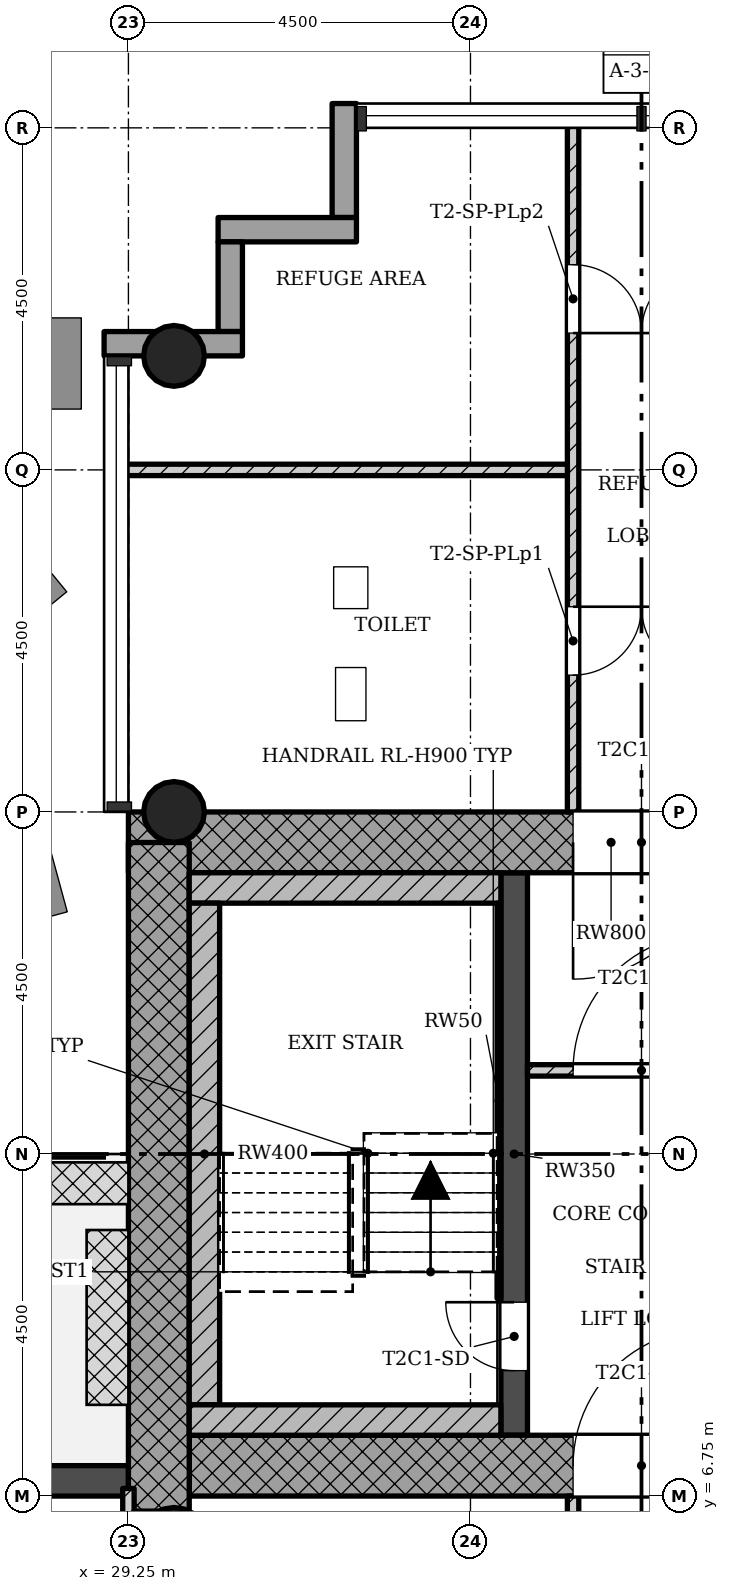
"""IFC4 building model, lengths in metres.
Left out: names, types, materials, properties, quantities, classifications, styles, units other than length and angle.
Written with IfcOpenShell. Run it as: python <this file> out.ifc"""

import sys

from ifc_helpers import new_model, si_unit, direction, frame, frame_2d, origin, origin_2d, place, context, subcontext, project, spatial, rectangle, hollow_circle, extrude, element, fill, save


model = new_model("IFC4")
c1 = context("Model", 3, precision=1e-05, world=origin(), true_north=direction((0.0, 1.0)))
c2 = subcontext(c1, "Body", "Model", "MODEL_VIEW")
j1 = project(units=[si_unit("LENGTHUNIT", "METRE"), si_unit("PLANEANGLEUNIT", "RADIAN")], contexts=[c1])
p1 = place(None, origin())
s1 = spatial("IfcSite", under=j1, at=p1, CompositionType="ELEMENT")
p2 = place(p1, origin())
s2 = spatial("IfcBuilding", under=s1, at=p2, CompositionType="ELEMENT")
p3 = place(p2, frame((0.0, 0.0, 128.7)))
s3 = spatial("IfcBuildingStorey", under=s2, at=p3, CompositionType="ELEMENT", Elevation=128.7)
p4 = place(p3, frame((30.05, 7.15, 0.0), z_axis=(0.0, 0.0, 1.0), x_axis=(1.0, 0.0, 0.0)))
e1 = element("IfcWall", 1, at=p4, inside=s3, PredefinedType="SHEAR", context=c2, shape_type="SweptSolid", body=[
    extrude(rectangle(XDim=12.7, YDim=0.8, at=frame_2d((6.35, 0.0))), origin(), (0.0, 0.0, 1.0), 5.0),
])
p5 = place(p4, frame((5.05, 0.0, 0.0)))
e2 = element("IfcOpeningElement", 2, at=p5, cuts=e1, PredefinedType="OPENING", context=c2, shape_type="SweptSolid", body=[
    extrude(rectangle(XDim=1.8, YDim=2.1, at=frame_2d((0.9, 1.05))), frame((0.0, 0.41, 0.0), z_axis=(0.0, -1.0, 0.0), x_axis=(1.0, 0.0, 0.0)), (0.0, 0.0, 1.0), 0.82),
])
p6 = place(p3, frame((41.95, 15.35, 0.0), z_axis=(0.0, 0.0, 1.0), x_axis=(-1.0, 0.0, 0.0)))
e3 = element("IfcWall", 3, at=p6, inside=s3, PredefinedType="SHEAR", context=c2, shape_type="SweptSolid", body=[
    extrude(rectangle(XDim=12.7, YDim=0.8, at=frame_2d((6.35, 0.0))), origin(), (0.0, 0.0, 1.0), 5.0),
])
p7 = place(p6, frame((5.05, 0.0, 0.0)))
e4 = element("IfcOpeningElement", 4, at=p7, cuts=e3, PredefinedType="OPENING", context=c2, shape_type="SweptSolid", body=[
    extrude(rectangle(XDim=1.8, YDim=2.1, at=frame_2d((0.9, 1.05))), frame((0.0, 0.41, 0.0), z_axis=(0.0, -1.0, 0.0), x_axis=(1.0, 0.0, 0.0)), (0.0, 0.0, 1.0), 0.82),
])
p8 = place(p3, frame((29.65, 15.348, 0.0), z_axis=(0.0, 0.0, 1.0), x_axis=(0.0, -1.0, 0.0)))
e5 = element("IfcWall", 5, at=p8, inside=s3, PredefinedType="SHEAR", context=c2, shape_type="SweptSolid", body=[
    extrude(rectangle(XDim=8.796, YDim=0.8, at=frame_2d((4.398, 0.0))), origin(), (0.0, 0.0, 1.0), 5.0),
])
p9 = place(p3, frame((34.325, 7.55, 0.0), z_axis=(0.0, 0.0, 1.0), x_axis=(0.0, 1.0, 0.0)))
e6 = element("IfcWall", 6, at=p9, inside=s3, PredefinedType="SHEAR", context=c2, shape_type="SweptSolid", body=[
    extrude(rectangle(XDim=7.4, YDim=0.35, at=frame_2d((3.7, 0.0))), origin(), (0.0, 0.0, 1.0), 5.0),
])
p10 = place(p9, frame((0.85, 0.0, 0.0)))
e7 = element("IfcOpeningElement", 7, at=p10, cuts=e6, PredefinedType="OPENING", context=c2, shape_type="SweptSolid", body=[
    extrude(rectangle(XDim=0.9, YDim=2.1, at=frame_2d((0.45, 1.05))), frame((0.0, 0.185, 0.0), z_axis=(0.0, -1.0, 0.0), x_axis=(1.0, 0.0, 0.0)), (0.0, 0.0, 1.0), 0.37),
])
for number, where, z_axis, x_axis in (
    (8, (29.85, 15.75, 0.0), (0.0, 0.0, 1.0), (1.0, 0.0, 0.0)),
    (9, (29.85, 21.75, 0.0), (0.0, 0.0, 1.0), (1.0, 0.0, 0.0)),
):
    element("IfcColumn", number, at=place(p3, frame(where, z_axis=z_axis, x_axis=x_axis)), inside=s3, PredefinedType="COLUMN", context=c2, shape_type="SweptSolid", body=[
        extrude(hollow_circle(Radius=0.4, WallThickness=0.028, at=origin_2d()), origin(), (0.0, 0.0, 1.0), 5.0),
    ])
p11 = place(p3, frame((29.85, 6.15, 0.0), z_axis=(0.0, 0.0, 1.0), x_axis=(1.0, 0.0, 0.0)))
e10 = element("IfcColumn", 10, at=p11, inside=s3, PredefinedType="COLUMN", context=c2, shape_type="SweptSolid", body=[
    extrude(hollow_circle(Radius=0.45, WallThickness=0.032, at=origin_2d()), origin(), (0.0, 0.0, 1.0), 5.0),
])
p12 = place(p3, frame((32.09, 25.07, -0.3), z_axis=(0.0, 0.0, 1.0), x_axis=(0.0, -1.0, 0.0)))
e11 = element("IfcWall", 11, at=p12, inside=s3, PredefinedType="STANDARD", context=c2, shape_type="SweptSolid", body=[
    extrude(rectangle(XDim=1.5, YDim=0.32, at=frame_2d((0.75, 0.0))), origin(), (0.0, 0.0, 1.0), 5.0),
])
p13 = place(p3, frame((32.25, 23.41, -0.3), z_axis=(0.0, 0.0, 1.0), x_axis=(-1.0, 0.0, 0.0)))
e12 = element("IfcWall", 12, at=p13, inside=s3, PredefinedType="STANDARD", context=c2, shape_type="SweptSolid", body=[
    extrude(rectangle(XDim=1.82, YDim=0.32, at=frame_2d((0.91, 0.0))), origin(), (0.0, 0.0, 1.0), 5.0),
])
p14 = place(p3, frame((30.59, 23.25, -0.3), z_axis=(0.0, 0.0, 1.0), x_axis=(0.0, -1.0, 0.0)))
e13 = element("IfcWall", 13, at=p14, inside=s3, PredefinedType="STANDARD", context=c2, shape_type="SweptSolid", body=[
    extrude(rectangle(XDim=1.18, YDim=0.32, at=frame_2d((0.59, 0.0))), origin(), (0.0, 0.0, 1.0), 5.0),
])
p15 = place(p3, frame((30.75, 21.91, -0.3), z_axis=(0.0, 0.0, 1.0), x_axis=(-1.0, 0.0, 0.0)))
e14 = element("IfcWall", 14, at=p15, inside=s3, PredefinedType="STANDARD", context=c2, shape_type="SweptSolid", body=[
    extrude(rectangle(XDim=1.82, YDim=0.32, at=frame_2d((0.91, 0.0))), origin(), (0.0, 0.0, 1.0), 5.0),
])
p16 = place(p3, frame((29.25, 6.95, -0.02), z_axis=(0.0, 0.0, 1.0), x_axis=(-1.0, 0.0, 0.0)))
e15 = element("IfcWall", 15, at=p16, inside=s3, PredefinedType="STANDARD", context=c2, shape_type="SweptSolid", body=[
    extrude(rectangle(XDim=4.5, YDim=0.4, at=frame_2d((2.25, 0.0))), origin(), (0.0, 0.0, 1.0), 4.72),
])
p17 = place(p16, frame((1.35, 0.0, 0.02)))
e16 = element("IfcOpeningElement", 16, at=p17, cuts=e15, PredefinedType="OPENING", context=c2, shape_type="SweptSolid", body=[
    extrude(rectangle(XDim=1.8, YDim=2.1, at=frame_2d((0.9, 1.05))), frame((0.0, 0.21, 0.0), z_axis=(0.0, -1.0, 0.0), x_axis=(1.0, 0.0, 0.0)), (0.0, 0.0, 1.0), 0.42),
])
p18 = place(p3, frame((37.5, 12.35, 0.0), z_axis=(0.0, 0.0, 1.0), x_axis=(-1.0, 0.0, 0.0)))
e17 = element("IfcWall", 17, at=p18, inside=s3, PredefinedType="PARTITIONING", context=c2, shape_type="SweptSolid", body=[
    extrude(rectangle(XDim=3.0, YDim=0.15, at=frame_2d((1.5, 0.0))), origin(), (0.0, 0.0, 1.0), 4.58),
])
p19 = place(p18, frame((0.6, 0.0, 0.0)))
e18 = element("IfcOpeningElement", 18, at=p19, cuts=e17, PredefinedType="OPENING", context=c2, shape_type="SweptSolid", body=[
    extrude(rectangle(XDim=1.8, YDim=2.1, at=frame_2d((0.9, 1.05))), frame((0.0, 0.085, 0.0), z_axis=(0.0, -1.0, 0.0), x_axis=(1.0, 0.0, 0.0)), (0.0, 0.0, 1.0), 0.17),
])
p20 = place(p3, frame((35.1, 0.9, 0.0), z_axis=(0.0, 0.0, 1.0), x_axis=(0.0, 1.0, 0.0)))
e19 = element("IfcWall", 19, at=p20, inside=s3, PredefinedType="PARTITIONING", context=c2, shape_type="SweptSolid", body=[
    extrude(rectangle(XDim=5.85, YDim=0.15, at=frame_2d((2.925, 0.0))), origin(), (0.0, 0.0, 1.0), 4.58),
])
p21 = place(p20, frame((2.475, 0.0, 0.0)))
e20 = element("IfcOpeningElement", 20, at=p21, cuts=e19, PredefinedType="OPENING", context=c2, shape_type="SweptSolid", body=[
    extrude(rectangle(XDim=0.9, YDim=2.1, at=frame_2d((0.45, 1.05))), frame((0.0, 0.085, 0.0), z_axis=(0.0, -1.0, 0.0), x_axis=(1.0, 0.0, 0.0)), (0.0, 0.0, 1.0), 0.17),
])
p22 = place(p3, frame((35.1, 15.75, 0.0), z_axis=(0.0, 0.0, 1.0), x_axis=(0.0, 1.0, 0.0)))
e21 = element("IfcWall", 21, at=p22, inside=s3, PredefinedType="PARTITIONING", context=c2, shape_type="SweptSolid", body=[
    extrude(rectangle(XDim=9.1, YDim=0.15, at=frame_2d((4.55, 0.0))), origin(), (0.0, 0.0, 1.0), 4.58),
])
p23 = place(p22, frame((1.8, 0.0, 0.0)))
e22 = element("IfcOpeningElement", 22, at=p23, cuts=e21, PredefinedType="OPENING", context=c2, shape_type="SweptSolid", body=[
    extrude(rectangle(XDim=0.9, YDim=2.1, at=frame_2d((0.45, 1.05))), frame((0.0, 0.085, 0.0), z_axis=(0.0, -1.0, 0.0), x_axis=(1.0, 0.0, 0.0)), (0.0, 0.0, 1.0), 0.17),
])
p24 = place(p22, frame((6.3, 0.0, 0.0)))
e23 = element("IfcOpeningElement", 23, at=p24, cuts=e21, PredefinedType="OPENING", context=c2, shape_type="SweptSolid", body=[
    extrude(rectangle(XDim=0.9, YDim=2.1, at=frame_2d((0.45, 1.05))), frame((0.0, 0.085, 0.0), z_axis=(0.0, -1.0, 0.0), x_axis=(1.0, 0.0, 0.0)), (0.0, 0.0, 1.0), 0.17),
])
p25 = place(p3, frame((35.025, 20.25, 0.0), z_axis=(0.0, 0.0, 1.0), x_axis=(-1.0, 0.0, 0.0)))
e24 = element("IfcWall", 24, at=p25, inside=s3, PredefinedType="PARTITIONING", context=c2, shape_type="SweptSolid", body=[
    extrude(rectangle(XDim=5.875, YDim=0.15, at=frame_2d((2.938, 0.0))), origin(), (0.0, 0.0, 1.0), 4.58),
])
p26 = place(p3, frame((29.25, -6.85, 0.0), z_axis=(0.0, 0.0, 1.0), x_axis=(0.0, 1.0, 0.0)))
e25 = element("IfcWall", 25, at=p26, inside=s3, PredefinedType="PARTITIONING", context=c2, shape_type="SweptSolid", body=[
    extrude(rectangle(XDim=13.7, YDim=0.15, at=frame_2d((6.85, 0.0))), origin(), (0.0, 0.0, 1.0), 4.58),
])
p27 = place(p26, frame((5.95, 0.0, 0.0)))
e26 = element("IfcOpeningElement", 26, at=p27, cuts=e25, PredefinedType="OPENING", context=c2, shape_type="SweptSolid", body=[
    extrude(rectangle(XDim=1.8, YDim=2.1, at=frame_2d((0.9, 1.05))), frame((0.0, 0.085, 0.0), z_axis=(0.0, -1.0, 0.0), x_axis=(1.0, 0.0, 0.0)), (0.0, 0.0, 1.0), 0.17),
])
p28 = place(p3, frame((34.15, 14.75, 0.0), z_axis=(0.0, 0.0, 1.0), x_axis=(-1.0, 0.0, 0.0)))
e27 = element("IfcWall", 27, at=p28, inside=s3, PredefinedType="SHEAR", context=c2, shape_type="SweptSolid", body=[
    extrude(rectangle(XDim=4.1, YDim=0.4, at=frame_2d((2.05, 0.0))), origin(), (0.0, 0.0, 1.0), 5.0),
])
p29 = place(p3, frame((30.25, 7.95, 0.0), z_axis=(0.0, 0.0, 1.0), x_axis=(0.0, 1.0, 0.0)))
e28 = element("IfcWall", 28, at=p29, inside=s3, PredefinedType="SHEAR", context=c2, shape_type="SweptSolid", body=[
    extrude(rectangle(XDim=6.6, YDim=0.4, at=frame_2d((3.3, 0.0))), origin(), (0.0, 0.0, 1.0), 5.0),
])
p30 = place(p3, frame((34.15, 7.75, 0.0), z_axis=(0.0, 0.0, 1.0), x_axis=(-1.0, 0.0, 0.0)))
e29 = element("IfcWall", 29, at=p30, inside=s3, PredefinedType="SHEAR", context=c2, shape_type="SweptSolid", body=[
    extrude(rectangle(XDim=4.1, YDim=0.4, at=frame_2d((2.05, 0.0))), origin(), (0.0, 0.0, 1.0), 5.0),
])
p31 = place(p3, frame((34.125, 9.35, 0.0), z_axis=(0.0, 0.0, 1.0), x_axis=(0.0, 1.0, 0.0)))
e30 = element("IfcWall", 30, at=p31, inside=s3, PredefinedType="SHEAR", context=c2, shape_type="SweptSolid", body=[
    extrude(rectangle(XDim=5.2, YDim=0.05, at=frame_2d((2.6, 0.0))), origin(), (0.0, 0.0, 1.0), 5.0),
])
p32 = place(p19, origin())
e31 = element("IfcDoor", 31, at=p32, inside=s3, OperationType="SINGLE_SWING_LEFT", PredefinedType="DOOR", context=c2, shape_type="SweptSolid", body=[
    extrude(rectangle(XDim=1.8, YDim=2.1, at=frame_2d((0.9, 1.05))), frame((0.0, 0.025, 0.0), z_axis=(0.0, -1.0, 0.0), x_axis=(1.0, 0.0, 0.0)), (0.0, 0.0, 1.0), 0.05),
])
fill(e18, e31)
p33 = place(p23, origin())
e32 = element("IfcDoor", 32, at=p33, inside=s3, OperationType="SINGLE_SWING_RIGHT", PredefinedType="DOOR", context=c2, shape_type="SweptSolid", body=[
    extrude(rectangle(XDim=0.9, YDim=2.1, at=frame_2d((0.45, 1.05))), frame((0.0, 0.025, 0.0), z_axis=(0.0, -1.0, 0.0), x_axis=(1.0, 0.0, 0.0)), (0.0, 0.0, 1.0), 0.05),
])
fill(e22, e32)
p34 = place(p24, origin())
e33 = element("IfcDoor", 33, at=p34, inside=s3, OperationType="SINGLE_SWING_LEFT", PredefinedType="DOOR", context=c2, shape_type="SweptSolid", body=[
    extrude(rectangle(XDim=0.9, YDim=2.1, at=frame_2d((0.45, 1.05))), frame((0.0, 0.025, 0.0), z_axis=(0.0, -1.0, 0.0), x_axis=(1.0, 0.0, 0.0)), (0.0, 0.0, 1.0), 0.05),
])
fill(e23, e33)
p35 = place(p10, origin())
e34 = element("IfcDoor", 34, at=p35, inside=s3, OperationType="SINGLE_SWING_LEFT", PredefinedType="DOOR", context=c2, shape_type="SweptSolid", body=[
    extrude(rectangle(XDim=0.9, YDim=2.1, at=frame_2d((0.45, 1.05))), frame((0.0, 0.025, 0.0), z_axis=(0.0, -1.0, 0.0), x_axis=(1.0, 0.0, 0.0)), (0.0, 0.0, 1.0), 0.05),
])
fill(e7, e34)
p36 = place(p5, origin())
e35 = element("IfcDoor", 35, at=p36, inside=s3, OperationType="SINGLE_SWING_LEFT", PredefinedType="DOOR", context=c2, shape_type="SweptSolid", body=[
    extrude(rectangle(XDim=1.8, YDim=2.1, at=frame_2d((0.9, 1.05))), frame((0.0, 0.025, 0.0), z_axis=(0.0, -1.0, 0.0), x_axis=(1.0, 0.0, 0.0)), (0.0, 0.0, 1.0), 0.05),
])
fill(e2, e35)
p37 = place(p7, origin())
e36 = element("IfcDoor", 36, at=p37, inside=s3, OperationType="SINGLE_SWING_LEFT", PredefinedType="DOOR", context=c2, shape_type="SweptSolid", body=[
    extrude(rectangle(XDim=1.8, YDim=2.1, at=frame_2d((0.9, 1.05))), frame((0.0, 0.025, 0.0), z_axis=(0.0, -1.0, 0.0), x_axis=(1.0, 0.0, 0.0)), (0.0, 0.0, 1.0), 0.05),
])
fill(e4, e36)
save(model, sys.argv[1])
